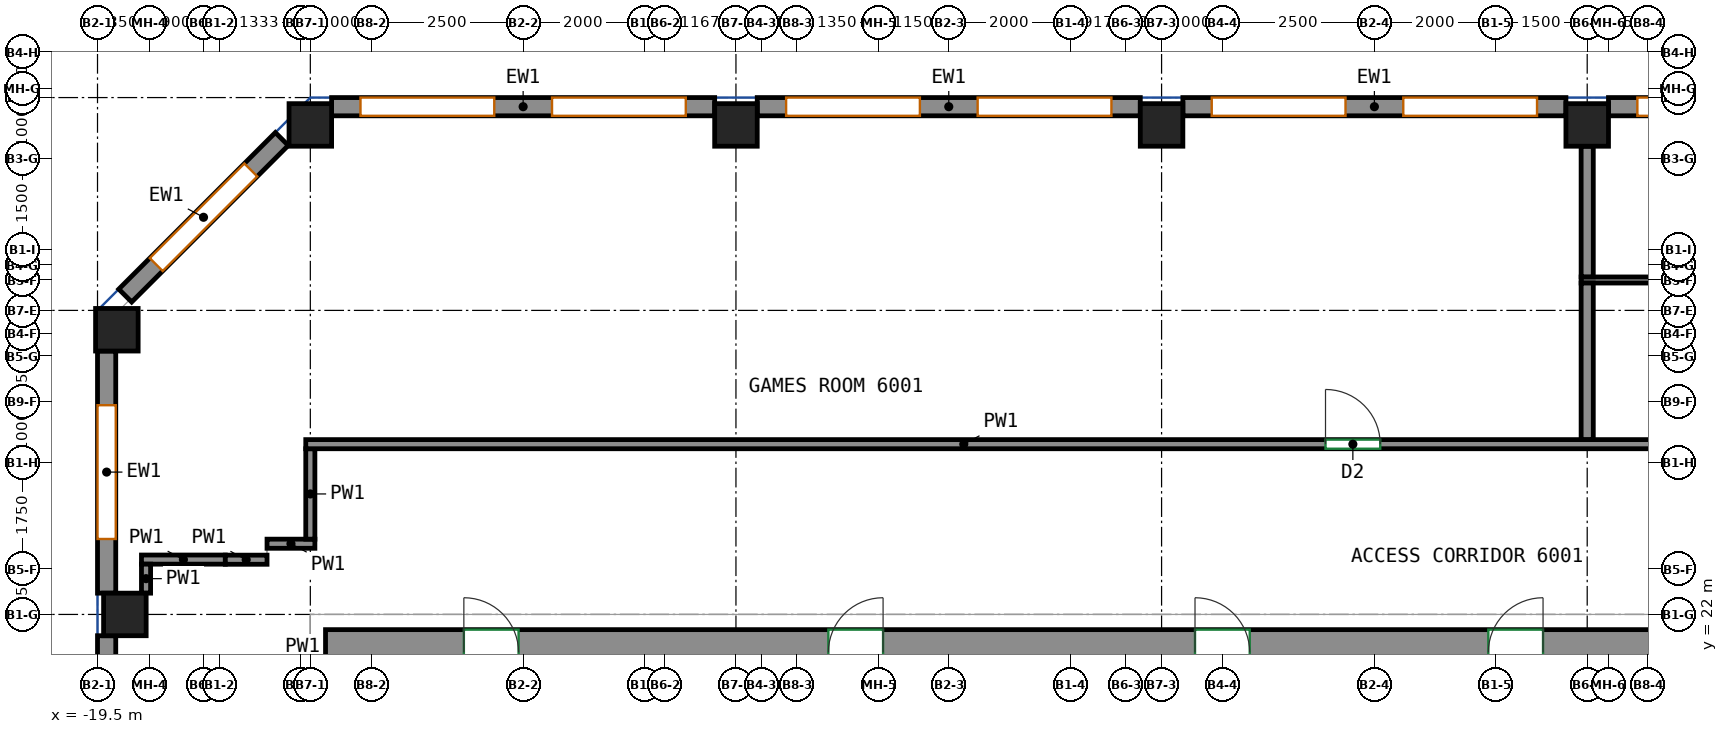
"""IFC4 building model, lengths in metres.
Left out: names, types, materials, properties, quantities, classifications, styles, units other than length and angle.
Written with IfcOpenShell. Run it as: python <this file> out.ifc"""

import sys

from ifc_helpers import new_model, si_unit, direction, frame, frame_2d, origin, origin_2d, place, context, subcontext, project, spatial, rectangle, extrude, source, transform, mapped, element, fill, save


model = new_model("IFC4")
c1 = context("Model", 3, precision=1e-05, world=origin(), true_north=direction((0.0, 1.0)))
c2 = subcontext(c1, "Body", "Model", "MODEL_VIEW")
j1 = project(units=[si_unit("LENGTHUNIT", "METRE"), si_unit("PLANEANGLEUNIT", "RADIAN")], contexts=[c1])
p1 = place(None, origin())
s1 = spatial("IfcSite", under=j1, at=p1, CompositionType="ELEMENT")
p2 = place(p1, origin())
s2 = spatial("IfcBuilding", under=s1, at=p2, CompositionType="ELEMENT")
p3 = place(p2, frame((0.0, 0.0, 249.2)))
s3 = spatial("IfcBuildingStorey", under=s2, at=p3, CompositionType="ELEMENT", Elevation=249.2)
m1 = source(origin(), c2, "Body", "SweptSolid", [
    extrude(rectangle(XDim=0.7, YDim=0.7, at=origin_2d()), origin(), (0.0, 0.0, 1.0), 3.12),
])
for number, where, z_axis, x_axis in (
    (1, (-19.182, 26.682, 0.0), (0.0, 0.0, 1.0), (1.0, 0.0, 0.0)),
    (2, (-19.05, 22.0, 0.0), (0.0, 0.0, 1.0), (1.0, 0.0, 0.0)),
    (3, (-16.0, 30.05, 0.0), (0.0, 0.0, 1.0), (1.0, 0.0, 0.0)),
    (4, (-9.0, 30.05, 0.0), (0.0, 0.0, 1.0), (1.0, 0.0, 0.0)),
    (5, (-2.0, 30.05, 0.0), (0.0, 0.0, 1.0), (1.0, 0.0, 0.0)),
    (6, (5.0, 30.05, 0.0), (0.0, 0.0, 1.0), (1.0, 0.0, 0.0)),
):
    element("IfcColumn", number, at=place(p3, frame(where, z_axis=z_axis, x_axis=x_axis)), inside=s3, PredefinedType="COLUMN", context=c2, shape_type="MappedRepresentation", body=[
        mapped(m1, transform((0.0, 0.0, 0.0))),
    ])
m2 = source(origin(), c2, "Body", "SweptSolid", [
    extrude(rectangle(XDim=33.6, YDim=0.75, at=frame_2d((16.8, 0.0))), origin(), (0.0, 0.0, 1.0), 3.12),
])
p4 = place(p3, frame((-15.75, 21.375, 0.0), z_axis=(0.0, 0.0, 1.0), x_axis=(1.0, 0.0, 0.0)))
e7 = element("IfcWall", 7, at=p4, inside=s3, PredefinedType="SHEAR", context=c2, shape_type="MappedRepresentation", body=[
    mapped(m2, transform((0.0, 0.0, 0.0))),
])
p5 = place(p4, frame((8.27, 0.0, 0.0)))
e8 = element("IfcOpeningElement", 8, at=p5, cuts=e7, PredefinedType="OPENING", context=c2, shape_type="SweptSolid", body=[
    extrude(rectangle(XDim=0.9, YDim=2.1, at=frame_2d((0.45, 1.05))), frame((0.0, 0.385, 0.0), z_axis=(0.0, -1.0, 0.0), x_axis=(1.0, 0.0, 0.0)), (0.0, 0.0, 1.0), 0.77),
])
p6 = place(p4, frame((14.3, 0.0, 0.0)))
e9 = element("IfcOpeningElement", 9, at=p6, cuts=e7, PredefinedType="OPENING", context=c2, shape_type="SweptSolid", body=[
    extrude(rectangle(XDim=0.9, YDim=2.1, at=frame_2d((0.45, 1.05))), frame((0.0, 0.385, 0.0), z_axis=(0.0, -1.0, 0.0), x_axis=(1.0, 0.0, 0.0)), (0.0, 0.0, 1.0), 0.77),
])
p7 = place(p4, frame((19.124, 0.0, 0.0)))
e10 = element("IfcOpeningElement", 10, at=p7, cuts=e7, PredefinedType="OPENING", context=c2, shape_type="SweptSolid", body=[
    extrude(rectangle(XDim=0.9, YDim=2.1, at=frame_2d((0.45, 1.05))), frame((0.0, 0.385, 0.0), z_axis=(0.0, -1.0, 0.0), x_axis=(1.0, 0.0, 0.0)), (0.0, 0.0, 1.0), 0.77),
])
p8 = place(p4, frame((23.814, 0.0, 0.0)))
e11 = element("IfcOpeningElement", 11, at=p8, cuts=e7, PredefinedType="OPENING", context=c2, shape_type="SweptSolid", body=[
    extrude(rectangle(XDim=0.9, YDim=2.1, at=frame_2d((0.45, 1.05))), frame((0.0, 0.385, 0.0), z_axis=(0.0, -1.0, 0.0), x_axis=(1.0, 0.0, 0.0)), (0.0, 0.0, 1.0), 0.77),
])
p9 = place(p4, frame((27.07, 0.0, 0.0)))
e12 = element("IfcOpeningElement", 12, at=p9, cuts=e7, PredefinedType="OPENING", context=c2, shape_type="SweptSolid", body=[
    extrude(rectangle(XDim=0.9, YDim=2.1, at=frame_2d((0.45, 1.05))), frame((0.0, 0.385, 0.0), z_axis=(0.0, -1.0, 0.0), x_axis=(1.0, 0.0, 0.0)), (0.0, 0.0, 1.0), 0.77),
])
p10 = place(p4, frame((2.275, 0.0, 0.0)))
e13 = element("IfcOpeningElement", 13, at=p10, cuts=e7, PredefinedType="OPENING", context=c2, shape_type="SweptSolid", body=[
    extrude(rectangle(XDim=0.9, YDim=2.1, at=frame_2d((0.45, 1.05))), frame((0.0, 0.385, 0.0), z_axis=(0.0, -1.0, 0.0), x_axis=(1.0, 0.0, 0.0)), (0.0, 0.0, 1.0), 0.77),
])
p11 = place(p4, frame((30.425, 0.0, 0.0)))
e14 = element("IfcOpeningElement", 14, at=p11, cuts=e7, PredefinedType="OPENING", context=c2, shape_type="SweptSolid", body=[
    extrude(rectangle(XDim=0.9, YDim=2.1, at=frame_2d((0.45, 1.05))), frame((0.0, 0.385, 0.0), z_axis=(0.0, -1.0, 0.0), x_axis=(1.0, 0.0, 0.0)), (0.0, 0.0, 1.0), 0.77),
])
m3 = source(origin(), c2, "Body", "SweptSolid", [
    extrude(rectangle(XDim=6.3, YDim=0.3, at=frame_2d((3.15, 0.0))), origin(), (0.0, 0.0, 1.0), 3.12),
])
p12 = place(p3, frame((11.65, 30.35, 0.0), z_axis=(0.0, 0.0, 1.0), x_axis=(-1.0, 0.0, 0.0)))
e15 = element("IfcWall", 15, at=p12, inside=s3, PredefinedType="SOLIDWALL", context=c2, shape_type="MappedRepresentation", body=[
    mapped(m3, transform((0.0, 0.0, 0.0))),
])
p13 = place(p12, frame((0.475, 0.0, 0.8)))
e16 = element("IfcOpeningElement", 16, at=p13, cuts=e15, PredefinedType="OPENING", context=c2, shape_type="SweptSolid", body=[
    extrude(rectangle(XDim=2.2, YDim=2.05, at=frame_2d((1.1, 1.025))), frame((0.0, 0.16, 0.0), z_axis=(0.0, -1.0, 0.0), x_axis=(1.0, 0.0, 0.0)), (0.0, 0.0, 1.0), 0.32),
])
p14 = place(p12, frame((3.625, 0.0, 0.8)))
e17 = element("IfcOpeningElement", 17, at=p14, cuts=e15, PredefinedType="OPENING", context=c2, shape_type="SweptSolid", body=[
    extrude(rectangle(XDim=2.2, YDim=2.05, at=frame_2d((1.1, 1.025))), frame((0.0, 0.16, 0.0), z_axis=(0.0, -1.0, 0.0), x_axis=(1.0, 0.0, 0.0)), (0.0, 0.0, 1.0), 0.32),
])
p15 = place(p3, frame((4.65, 30.35, 0.0), z_axis=(0.0, 0.0, 1.0), x_axis=(-1.0, 0.0, 0.0)))
e18 = element("IfcWall", 18, at=p15, inside=s3, PredefinedType="SOLIDWALL", context=c2, shape_type="MappedRepresentation", body=[
    mapped(m3, transform((0.0, 0.0, 0.0))),
])
p16 = place(p15, frame((0.475, 0.0, 0.8)))
e19 = element("IfcOpeningElement", 19, at=p16, cuts=e18, PredefinedType="OPENING", context=c2, shape_type="SweptSolid", body=[
    extrude(rectangle(XDim=2.2, YDim=2.05, at=frame_2d((1.1, 1.025))), frame((0.0, 0.16, 0.0), z_axis=(0.0, -1.0, 0.0), x_axis=(1.0, 0.0, 0.0)), (0.0, 0.0, 1.0), 0.32),
])
p17 = place(p15, frame((3.625, 0.0, 0.8)))
e20 = element("IfcOpeningElement", 20, at=p17, cuts=e18, PredefinedType="OPENING", context=c2, shape_type="SweptSolid", body=[
    extrude(rectangle(XDim=2.2, YDim=2.05, at=frame_2d((1.1, 1.025))), frame((0.0, 0.16, 0.0), z_axis=(0.0, -1.0, 0.0), x_axis=(1.0, 0.0, 0.0)), (0.0, 0.0, 1.0), 0.32),
])
p18 = place(p3, frame((-2.35, 30.35, 0.0), z_axis=(0.0, 0.0, 1.0), x_axis=(-1.0, 0.0, 0.0)))
e21 = element("IfcWall", 21, at=p18, inside=s3, PredefinedType="SOLIDWALL", context=c2, shape_type="MappedRepresentation", body=[
    mapped(m3, transform((0.0, 0.0, 0.0))),
])
p19 = place(p18, frame((0.475, 0.0, 0.8)))
e22 = element("IfcOpeningElement", 22, at=p19, cuts=e21, PredefinedType="OPENING", context=c2, shape_type="SweptSolid", body=[
    extrude(rectangle(XDim=2.2, YDim=2.05, at=frame_2d((1.1, 1.025))), frame((0.0, 0.16, 0.0), z_axis=(0.0, -1.0, 0.0), x_axis=(1.0, 0.0, 0.0)), (0.0, 0.0, 1.0), 0.32),
])
p20 = place(p18, frame((3.625, 0.0, 0.8)))
e23 = element("IfcOpeningElement", 23, at=p20, cuts=e21, PredefinedType="OPENING", context=c2, shape_type="SweptSolid", body=[
    extrude(rectangle(XDim=2.2, YDim=2.05, at=frame_2d((1.1, 1.025))), frame((0.0, 0.16, 0.0), z_axis=(0.0, -1.0, 0.0), x_axis=(1.0, 0.0, 0.0)), (0.0, 0.0, 1.0), 0.32),
])
p21 = place(p3, frame((-9.35, 30.35, 0.0), z_axis=(0.0, 0.0, 1.0), x_axis=(-1.0, 0.0, 0.0)))
e24 = element("IfcWall", 24, at=p21, inside=s3, PredefinedType="SOLIDWALL", context=c2, shape_type="MappedRepresentation", body=[
    mapped(m3, transform((0.0, 0.0, 0.0))),
])
p22 = place(p21, frame((0.475, 0.0, 0.8)))
e25 = element("IfcOpeningElement", 25, at=p22, cuts=e24, PredefinedType="OPENING", context=c2, shape_type="SweptSolid", body=[
    extrude(rectangle(XDim=2.2, YDim=2.05, at=frame_2d((1.1, 1.025))), frame((0.0, 0.16, 0.0), z_axis=(0.0, -1.0, 0.0), x_axis=(1.0, 0.0, 0.0)), (0.0, 0.0, 1.0), 0.32),
])
p23 = place(p21, frame((3.625, 0.0, 0.8)))
e26 = element("IfcOpeningElement", 26, at=p23, cuts=e24, PredefinedType="OPENING", context=c2, shape_type="SweptSolid", body=[
    extrude(rectangle(XDim=2.2, YDim=2.05, at=frame_2d((1.1, 1.025))), frame((0.0, 0.16, 0.0), z_axis=(0.0, -1.0, 0.0), x_axis=(1.0, 0.0, 0.0)), (0.0, 0.0, 1.0), 0.32),
])
m4 = source(origin(), c2, "Body", "SweptSolid", [
    extrude(rectangle(XDim=3.642, YDim=0.3, at=frame_2d((1.821, 0.0))), origin(), (0.0, 0.0, 1.0), 3.12),
])
p24 = place(p3, frame((-16.469, 29.819, 0.0), z_axis=(0.0, 0.0, 1.0), x_axis=(-0.707106781187, -0.707106781187, 0.0)))
e27 = element("IfcWall", 27, at=p24, inside=s3, PredefinedType="SOLIDWALL", context=c2, shape_type="MappedRepresentation", body=[
    mapped(m4, transform((0.0, 0.0, 0.0))),
])
p25 = place(p24, frame((0.721, 0.0, 0.8)))
e28 = element("IfcOpeningElement", 28, at=p25, cuts=e27, PredefinedType="OPENING", context=c2, shape_type="SweptSolid", body=[
    extrude(rectangle(XDim=2.2, YDim=2.05, at=frame_2d((1.1, 1.025))), frame((0.0, 0.16, 0.0), z_axis=(0.0, -1.0, 0.0), x_axis=(1.0, 0.0, 0.0)), (0.0, 0.0, 1.0), 0.32),
])
m5 = source(origin(), c2, "Body", "SweptSolid", [
    extrude(rectangle(XDim=3.982, YDim=0.3, at=frame_2d((1.991, 0.0))), origin(), (0.0, 0.0, 1.0), 3.12),
])
p26 = place(p3, frame((-19.35, 26.332, 0.0), z_axis=(0.0, 0.0, 1.0), x_axis=(0.0, -1.0, 0.0)))
e29 = element("IfcWall", 29, at=p26, inside=s3, PredefinedType="SOLIDWALL", context=c2, shape_type="MappedRepresentation", body=[
    mapped(m5, transform((0.0, 0.0, 0.0))),
])
p27 = place(p26, frame((0.891, 0.0, 0.8)))
e30 = element("IfcOpeningElement", 30, at=p27, cuts=e29, PredefinedType="OPENING", context=c2, shape_type="SweptSolid", body=[
    extrude(rectangle(XDim=2.2, YDim=2.05, at=frame_2d((1.1, 1.025))), frame((0.0, 0.16, 0.0), z_axis=(0.0, -1.0, 0.0), x_axis=(1.0, 0.0, 0.0)), (0.0, 0.0, 1.0), 0.32),
])
m6 = source(origin(), c2, "Body", "SweptSolid", [
    extrude(rectangle(XDim=13.3, YDim=0.3, at=frame_2d((6.65, 0.0))), origin(), (0.0, 0.0, 1.0), 3.12),
])
p28 = place(p3, frame((-19.35, 21.65, 0.0), z_axis=(0.0, 0.0, 1.0), x_axis=(0.0, -1.0, 0.0)))
e31 = element("IfcWall", 31, at=p28, inside=s3, PredefinedType="SOLIDWALL", context=c2, shape_type="MappedRepresentation", body=[
    mapped(m6, transform((0.0, 0.0, 0.0))),
])
p29 = place(p28, frame((0.562, 0.0, 0.8)))
e32 = element("IfcOpeningElement", 32, at=p29, cuts=e31, PredefinedType="OPENING", context=c2, shape_type="SweptSolid", body=[
    extrude(rectangle(XDim=2.2, YDim=2.05, at=frame_2d((1.1, 1.025))), frame((0.0, 0.16, 0.0), z_axis=(0.0, -1.0, 0.0), x_axis=(1.0, 0.0, 0.0)), (0.0, 0.0, 1.0), 0.32),
])
p30 = place(p28, frame((3.887, 0.0, 0.8)))
e33 = element("IfcOpeningElement", 33, at=p30, cuts=e31, PredefinedType="OPENING", context=c2, shape_type="SweptSolid", body=[
    extrude(rectangle(XDim=2.2, YDim=2.05, at=frame_2d((1.1, 1.025))), frame((0.0, 0.16, 0.0), z_axis=(0.0, -1.0, 0.0), x_axis=(1.0, 0.0, 0.0)), (0.0, 0.0, 1.0), 0.32),
])
p31 = place(p28, frame((7.212, 0.0, 0.8)))
e34 = element("IfcOpeningElement", 34, at=p31, cuts=e31, PredefinedType="OPENING", context=c2, shape_type="SweptSolid", body=[
    extrude(rectangle(XDim=2.2, YDim=2.05, at=frame_2d((1.1, 1.025))), frame((0.0, 0.16, 0.0), z_axis=(0.0, -1.0, 0.0), x_axis=(1.0, 0.0, 0.0)), (0.0, 0.0, 1.0), 0.32),
])
p32 = place(p28, frame((10.538, 0.0, 0.8)))
e35 = element("IfcOpeningElement", 35, at=p32, cuts=e31, PredefinedType="OPENING", context=c2, shape_type="SweptSolid", body=[
    extrude(rectangle(XDim=2.2, YDim=2.05, at=frame_2d((1.1, 1.025))), frame((0.0, 0.16, 0.0), z_axis=(0.0, -1.0, 0.0), x_axis=(1.0, 0.0, 0.0)), (0.0, 0.0, 1.0), 0.32),
])
p33 = place(p3, frame((-17.398, 22.902, 0.0), z_axis=(0.0, 0.0, 1.0), x_axis=(-1.0, 0.0, 0.0)))
e36 = element("IfcWall", 36, at=p33, inside=s3, PredefinedType="PARTITIONING", context=c2, shape_type="SweptSolid", body=[
    extrude(rectangle(XDim=1.379, YDim=0.15, at=frame_2d((0.689, 0.0))), origin(), (0.0, 0.0, 1.0), 3.12),
])
p34 = place(p3, frame((-16.712, 22.9, 0.0), z_axis=(0.0, 0.0, 1.0), x_axis=(-1.0, 0.0, 0.0)))
e37 = element("IfcWall", 37, at=p34, inside=s3, PredefinedType="PARTITIONING", context=c2, shape_type="SweptSolid", body=[
    extrude(rectangle(XDim=0.686, YDim=0.15, at=frame_2d((0.343, 0.0))), origin(), (0.0, 0.0, 1.0), 3.12),
])
p35 = place(p3, frame((-15.925, 23.163, 0.0), z_axis=(0.0, 0.0, 1.0), x_axis=(-1.0, 0.0, 0.0)))
e38 = element("IfcWall", 38, at=p35, inside=s3, PredefinedType="PARTITIONING", context=c2, shape_type="SweptSolid", body=[
    extrude(rectangle(XDim=0.787, YDim=0.15, at=frame_2d((0.394, 0.0))), origin(), (0.0, 0.0, 1.0), 3.12),
])
p36 = place(p3, frame((-16.0, 23.238, 0.0), z_axis=(0.0, 0.0, 1.0), x_axis=(0.0, 1.0, 0.0)))
e39 = element("IfcWall", 39, at=p36, inside=s3, PredefinedType="PARTITIONING", context=c2, shape_type="SweptSolid", body=[
    extrude(rectangle(XDim=1.487, YDim=0.15, at=frame_2d((0.744, 0.0))), origin(), (0.0, 0.0, 1.0), 3.12),
])
p37 = place(p3, frame((-16.075, 24.8, 0.0), z_axis=(0.0, 0.0, 1.0), x_axis=(1.0, 0.0, 0.0)))
e40 = element("IfcWall", 40, at=p37, inside=s3, PredefinedType="PARTITIONING", context=c2, shape_type="SweptSolid", body=[
    extrude(rectangle(XDim=36.073, YDim=0.15, at=frame_2d((18.037, 0.0))), origin(), (0.0, 0.0, 1.0), 3.12),
])
p38 = place(p37, frame((16.771, 0.0, 0.0)))
e41 = element("IfcOpeningElement", 41, at=p38, cuts=e40, PredefinedType="OPENING", context=c2, shape_type="SweptSolid", body=[
    extrude(rectangle(XDim=0.9, YDim=2.1, at=frame_2d((0.45, 1.05))), frame((0.0, 0.085, 0.0), z_axis=(0.0, -1.0, 0.0), x_axis=(1.0, 0.0, 0.0)), (0.0, 0.0, 1.0), 0.17),
])
p39 = place(p37, frame((30.279, 0.0, 0.0)))
e42 = element("IfcOpeningElement", 42, at=p39, cuts=e40, PredefinedType="OPENING", context=c2, shape_type="SweptSolid", body=[
    extrude(rectangle(XDim=1.0, YDim=2.1, at=frame_2d((0.5, 1.05))), frame((0.0, 0.085, 0.0), z_axis=(0.0, -1.0, 0.0), x_axis=(1.0, 0.0, 0.0)), (0.0, 0.0, 1.0), 0.17),
])
p40 = place(p3, frame((-18.702, 22.827, 0.0), z_axis=(0.0, 0.0, 1.0), x_axis=(0.0, -1.0, 0.0)))
e43 = element("IfcWall", 43, at=p40, inside=s3, PredefinedType="PARTITIONING", context=c2, shape_type="SweptSolid", body=[
    extrude(rectangle(XDim=0.477, YDim=0.15, at=frame_2d((0.238, 0.0))), origin(), (0.0, 0.0, 1.0), 3.12),
])
p41 = place(p3, frame((4.9, 27.5, 0.0), z_axis=(0.0, 0.0, 1.0), x_axis=(1.0, 0.0, 0.0)))
e44 = element("IfcWall", 44, at=p41, inside=s3, PredefinedType="PARTITIONING", context=c2, shape_type="SweptSolid", body=[
    extrude(rectangle(XDim=17.798, YDim=0.1, at=frame_2d((8.899, 0.0))), origin(), (0.0, 0.0, 1.0), 3.12),
])
p42 = place(p41, frame((8.806, 0.0, 0.0)))
e45 = element("IfcOpeningElement", 45, at=p42, cuts=e44, PredefinedType="OPENING", context=c2, shape_type="SweptSolid", body=[
    extrude(rectangle(XDim=1.0, YDim=2.1, at=frame_2d((0.5, 1.05))), frame((0.0, 0.06, 0.0), z_axis=(0.0, -1.0, 0.0), x_axis=(1.0, 0.0, 0.0)), (0.0, 0.0, 1.0), 0.12),
])
p43 = place(p41, frame((10.897, 0.0, 0.0)))
e46 = element("IfcOpeningElement", 46, at=p43, cuts=e44, PredefinedType="OPENING", context=c2, shape_type="SweptSolid", body=[
    extrude(rectangle(XDim=1.0, YDim=2.1, at=frame_2d((0.5, 1.05))), frame((0.0, 0.06, 0.0), z_axis=(0.0, -1.0, 0.0), x_axis=(1.0, 0.0, 0.0)), (0.0, 0.0, 1.0), 0.12),
])
p44 = place(p3, frame((5.0, 24.877, 0.0), z_axis=(0.0, 0.0, 1.0), x_axis=(0.0, 1.0, 0.0)))
e47 = element("IfcWall", 47, at=p44, inside=s3, PredefinedType="PARTITIONING", context=c2, shape_type="SweptSolid", body=[
    extrude(rectangle(XDim=2.573, YDim=0.2, at=frame_2d((1.287, 0.0))), origin(), (0.0, 0.0, 1.0), 3.12),
])
p45 = place(p3, frame((5.0, 27.552, 0.0), z_axis=(0.0, 0.0, 1.0), x_axis=(0.0, 1.0, 0.0)))
e48 = element("IfcWall", 48, at=p45, inside=s3, PredefinedType="PARTITIONING", context=c2, shape_type="SweptSolid", body=[
    extrude(rectangle(XDim=2.148, YDim=0.2, at=frame_2d((1.074, 0.0))), origin(), (0.0, 0.0, 1.0), 3.12),
])
p46 = place(p14, origin())
e49 = element("IfcWindow", 49, at=p46, inside=s3, PartitioningType="SINGLE_PANEL", PredefinedType="WINDOW", context=c2, shape_type="SweptSolid", body=[
    extrude(rectangle(XDim=2.2, YDim=2.05, at=frame_2d((1.1, 1.025))), frame((0.0, 0.03, 0.0), z_axis=(0.0, -1.0, 0.0), x_axis=(1.0, 0.0, 0.0)), (0.0, 0.0, 1.0), 0.06),
])
fill(e17, e49)
p47 = place(p16, origin())
e50 = element("IfcWindow", 50, at=p47, inside=s3, PartitioningType="SINGLE_PANEL", PredefinedType="WINDOW", context=c2, shape_type="SweptSolid", body=[
    extrude(rectangle(XDim=2.2, YDim=2.05, at=frame_2d((1.1, 1.025))), frame((0.0, 0.03, 0.0), z_axis=(0.0, -1.0, 0.0), x_axis=(1.0, 0.0, 0.0)), (0.0, 0.0, 1.0), 0.06),
])
fill(e19, e50)
p48 = place(p17, origin())
e51 = element("IfcWindow", 51, at=p48, inside=s3, PartitioningType="SINGLE_PANEL", PredefinedType="WINDOW", context=c2, shape_type="SweptSolid", body=[
    extrude(rectangle(XDim=2.2, YDim=2.05, at=frame_2d((1.1, 1.025))), frame((0.0, 0.03, 0.0), z_axis=(0.0, -1.0, 0.0), x_axis=(1.0, 0.0, 0.0)), (0.0, 0.0, 1.0), 0.06),
])
fill(e20, e51)
p49 = place(p19, origin())
e52 = element("IfcWindow", 52, at=p49, inside=s3, PartitioningType="SINGLE_PANEL", PredefinedType="WINDOW", context=c2, shape_type="SweptSolid", body=[
    extrude(rectangle(XDim=2.2, YDim=2.05, at=frame_2d((1.1, 1.025))), frame((0.0, 0.03, 0.0), z_axis=(0.0, -1.0, 0.0), x_axis=(1.0, 0.0, 0.0)), (0.0, 0.0, 1.0), 0.06),
])
fill(e22, e52)
p50 = place(p20, origin())
e53 = element("IfcWindow", 53, at=p50, inside=s3, PartitioningType="SINGLE_PANEL", PredefinedType="WINDOW", context=c2, shape_type="SweptSolid", body=[
    extrude(rectangle(XDim=2.2, YDim=2.05, at=frame_2d((1.1, 1.025))), frame((0.0, 0.03, 0.0), z_axis=(0.0, -1.0, 0.0), x_axis=(1.0, 0.0, 0.0)), (0.0, 0.0, 1.0), 0.06),
])
fill(e23, e53)
p51 = place(p22, origin())
e54 = element("IfcWindow", 54, at=p51, inside=s3, PartitioningType="SINGLE_PANEL", PredefinedType="WINDOW", context=c2, shape_type="SweptSolid", body=[
    extrude(rectangle(XDim=2.2, YDim=2.05, at=frame_2d((1.1, 1.025))), frame((0.0, 0.03, 0.0), z_axis=(0.0, -1.0, 0.0), x_axis=(1.0, 0.0, 0.0)), (0.0, 0.0, 1.0), 0.06),
])
fill(e25, e54)
p52 = place(p23, origin())
e55 = element("IfcWindow", 55, at=p52, inside=s3, PartitioningType="SINGLE_PANEL", PredefinedType="WINDOW", context=c2, shape_type="SweptSolid", body=[
    extrude(rectangle(XDim=2.2, YDim=2.05, at=frame_2d((1.1, 1.025))), frame((0.0, 0.03, 0.0), z_axis=(0.0, -1.0, 0.0), x_axis=(1.0, 0.0, 0.0)), (0.0, 0.0, 1.0), 0.06),
])
fill(e26, e55)
p53 = place(p25, origin())
e56 = element("IfcWindow", 56, at=p53, inside=s3, PartitioningType="SINGLE_PANEL", PredefinedType="WINDOW", context=c2, shape_type="SweptSolid", body=[
    extrude(rectangle(XDim=2.2, YDim=2.05, at=frame_2d((1.1, 1.025))), frame((0.0, 0.03, 0.0), z_axis=(0.0, -1.0, 0.0), x_axis=(1.0, 0.0, 0.0)), (0.0, 0.0, 1.0), 0.06),
])
fill(e28, e56)
p54 = place(p27, origin())
e57 = element("IfcWindow", 57, at=p54, inside=s3, PartitioningType="SINGLE_PANEL", PredefinedType="WINDOW", context=c2, shape_type="SweptSolid", body=[
    extrude(rectangle(XDim=2.2, YDim=2.05, at=frame_2d((1.1, 1.025))), frame((0.0, 0.03, 0.0), z_axis=(0.0, -1.0, 0.0), x_axis=(1.0, 0.0, 0.0)), (0.0, 0.0, 1.0), 0.06),
])
fill(e30, e57)
p55 = place(p38, origin())
e58 = element("IfcDoor", 58, at=p55, inside=s3, OperationType="SINGLE_SWING_LEFT", PredefinedType="DOOR", context=c2, shape_type="SweptSolid", body=[
    extrude(rectangle(XDim=0.9, YDim=2.1, at=frame_2d((0.45, 1.05))), frame((0.0, 0.025, 0.0), z_axis=(0.0, -1.0, 0.0), x_axis=(1.0, 0.0, 0.0)), (0.0, 0.0, 1.0), 0.05),
])
fill(e41, e58)
save(model, sys.argv[1])
